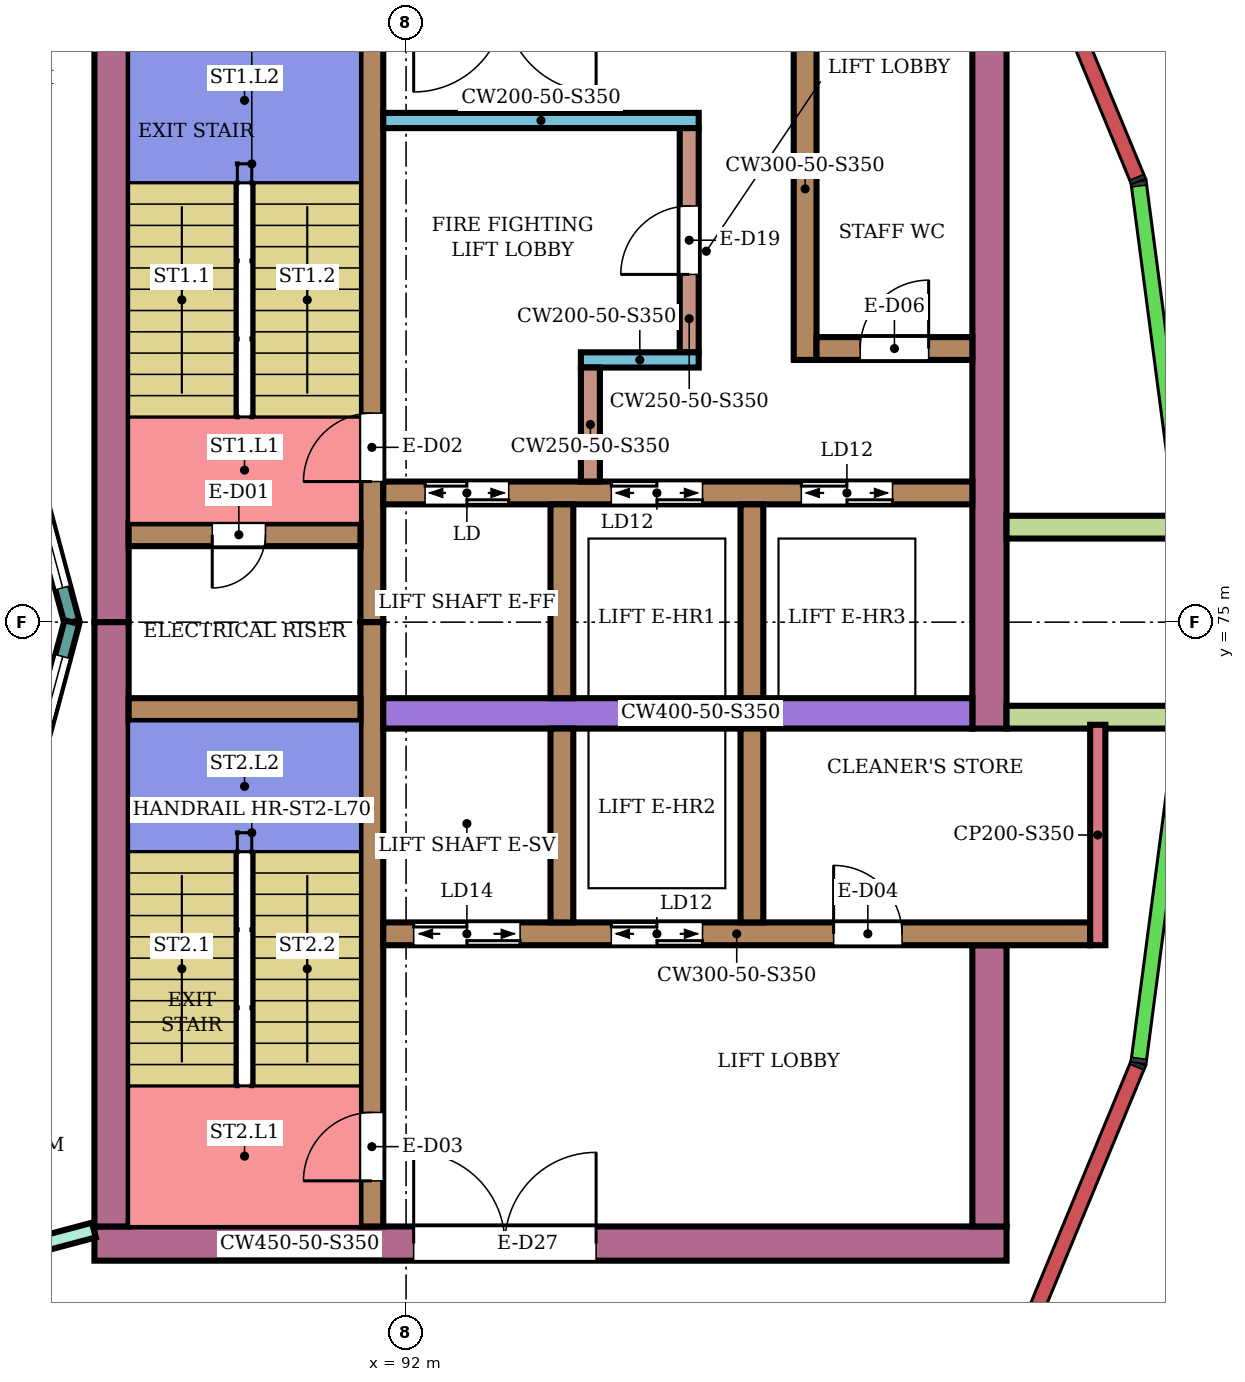
"""IFC4 building model, lengths in metres.
Left out: names, types, materials, properties, quantities, classifications, styles, units other than length and angle.
Written with IfcOpenShell. Run it as: python <this file> out.ifc"""

import sys

from ifc_helpers import new_model, si_unit, direction, frame, frame_2d, origin, place, context, subcontext, project, spatial, rectangle, extrude, element, fill, save


model = new_model("IFC4")
c1 = context("Model", 3, precision=1e-05, world=origin(), true_north=direction((0.0, 1.0)))
c2 = subcontext(c1, "Body", "Model", "MODEL_VIEW")
j1 = project(units=[si_unit("LENGTHUNIT", "METRE"), si_unit("PLANEANGLEUNIT", "RADIAN")], contexts=[c1])
p1 = place(None, origin())
s1 = spatial("IfcSite", under=j1, at=p1, CompositionType="ELEMENT")
p2 = place(p1, origin())
s2 = spatial("IfcBuilding", under=s1, at=p2, CompositionType="ELEMENT")
p3 = place(p2, frame((0.0, 0.0, 305.1)))
s3 = spatial("IfcBuildingStorey", under=s2, at=p3, CompositionType="ELEMENT", Elevation=305.1)
p4 = place(p3, frame((87.9, 66.825, 0.0), z_axis=(0.0, 0.0, 1.0), x_axis=(1.0, 0.0, 0.0)))
e1 = element("IfcWall", 1, at=p4, inside=s3, PredefinedType="SHEAR", context=c2, shape_type="SweptSolid", body=[
    extrude(rectangle(XDim=12.0, YDim=0.45, at=frame_2d((6.0, 0.0))), origin(), (0.0, 0.0, 1.0), 3.85),
])
p5 = place(p4, frame((4.2, 0.0, 0.0)))
e2 = element("IfcOpeningElement", 2, at=p5, cuts=e1, PredefinedType="OPENING", context=c2, shape_type="SweptSolid", body=[
    extrude(rectangle(XDim=2.4, YDim=2.4, at=frame_2d((1.2, 1.2))), frame((0.0, 0.235, 0.0), z_axis=(0.0, -1.0, 0.0), x_axis=(1.0, 0.0, 0.0)), (0.0, 0.0, 1.0), 0.47),
])
for number, where, z_axis, x_axis in (
    (3, (88.125, 75.0, 0.0), (0.0, 0.0, 1.0), (0.0, 1.0, 0.0)),
    (4, (88.125, 67.05, 0.0), (0.0, 0.0, 1.0), (0.0, 1.0, 0.0)),
):
    element("IfcWall", number, at=place(p3, frame(where, z_axis=z_axis, x_axis=x_axis)), inside=s3, PredefinedType="SHEAR", context=c2, shape_type="SweptSolid", body=[
        extrude(rectangle(XDim=7.95, YDim=0.45, at=frame_2d((3.975, 0.0))), origin(), (0.0, 0.0, 1.0), 3.85),
    ])
p6 = place(p3, frame((99.675, 73.6, 0.0), z_axis=(0.0, 0.0, 1.0), x_axis=(0.0, 1.0, 0.0)))
e5 = element("IfcWall", 5, at=p6, inside=s3, PredefinedType="SHEAR", context=c2, shape_type="SweptSolid", body=[
    extrude(rectangle(XDim=9.35, YDim=0.45, at=frame_2d((4.675, 0.0))), origin(), (0.0, 0.0, 1.0), 3.85),
])
p7 = place(p3, frame((99.675, 67.05, 0.0), z_axis=(0.0, 0.0, 1.0), x_axis=(0.0, 1.0, 0.0)))
e6 = element("IfcWall", 6, at=p7, inside=s3, PredefinedType="SHEAR", context=c2, shape_type="SweptSolid", body=[
    extrude(rectangle(XDim=3.7, YDim=0.45, at=frame_2d((1.85, 0.0))), origin(), (0.0, 0.0, 1.0), 3.85),
])
p8 = place(p3, frame((91.55, 75.0, 0.0), z_axis=(0.0, 0.0, 1.0), x_axis=(0.0, 1.0, 0.0)))
e7 = element("IfcWall", 7, at=p8, inside=s3, PredefinedType="SHEAR", context=c2, shape_type="SweptSolid", body=[
    extrude(rectangle(XDim=7.95, YDim=0.3, at=frame_2d((3.975, 0.0))), origin(), (0.0, 0.0, 1.0), 3.85),
])
p9 = place(p8, frame((1.85, 0.0, 0.0)))
e8 = element("IfcOpeningElement", 8, at=p9, cuts=e7, PredefinedType="OPENING", context=c2, shape_type="SweptSolid", body=[
    extrude(rectangle(XDim=0.9, YDim=2.1, at=frame_2d((0.45, 1.05))), frame((0.0, 0.16, 0.0), z_axis=(0.0, -1.0, 0.0), x_axis=(1.0, 0.0, 0.0)), (0.0, 0.0, 1.0), 0.32),
])
p10 = place(p3, frame((91.55, 67.05, 0.0), z_axis=(0.0, 0.0, 1.0), x_axis=(0.0, 1.0, 0.0)))
e9 = element("IfcWall", 9, at=p10, inside=s3, PredefinedType="SHEAR", context=c2, shape_type="SweptSolid", body=[
    extrude(rectangle(XDim=7.95, YDim=0.3, at=frame_2d((3.975, 0.0))), origin(), (0.0, 0.0, 1.0), 3.85),
])
p11 = place(p10, frame((0.6, 0.0, 0.0)))
e10 = element("IfcOpeningElement", 10, at=p11, cuts=e9, PredefinedType="OPENING", context=c2, shape_type="SweptSolid", body=[
    extrude(rectangle(XDim=0.9, YDim=2.1, at=frame_2d((0.45, 1.05))), frame((0.0, 0.16, 0.0), z_axis=(0.0, -1.0, 0.0), x_axis=(1.0, 0.0, 0.0)), (0.0, 0.0, 1.0), 0.32),
])
p12 = place(p3, frame((88.35, 76.15, 0.0), z_axis=(0.0, 0.0, 1.0), x_axis=(1.0, 0.0, 0.0)))
e11 = element("IfcWall", 11, at=p12, inside=s3, PredefinedType="SHEAR", context=c2, shape_type="SweptSolid", body=[
    extrude(rectangle(XDim=3.05, YDim=0.3, at=frame_2d((1.525, 0.0))), origin(), (0.0, 0.0, 1.0), 3.85),
])
p13 = place(p12, frame((1.1, 0.0, 0.0)))
e12 = element("IfcOpeningElement", 12, at=p13, cuts=e11, PredefinedType="OPENING", context=c2, shape_type="SweptSolid", body=[
    extrude(rectangle(XDim=0.7, YDim=2.0, at=frame_2d((0.35, 1.0))), frame((0.0, 0.16, 0.0), z_axis=(0.0, -1.0, 0.0), x_axis=(1.0, 0.0, 0.0)), (0.0, 0.0, 1.0), 0.32),
])
p14 = place(p3, frame((88.35, 73.85, 0.0), z_axis=(0.0, 0.0, 1.0), x_axis=(1.0, 0.0, 0.0)))
e13 = element("IfcWall", 13, at=p14, inside=s3, PredefinedType="SHEAR", context=c2, shape_type="SweptSolid", body=[
    extrude(rectangle(XDim=3.05, YDim=0.3, at=frame_2d((1.525, 0.0))), origin(), (0.0, 0.0, 1.0), 3.85),
])
p15 = place(p3, frame((91.7, 76.7, 0.0), z_axis=(0.0, 0.0, 1.0), x_axis=(1.0, 0.0, 0.0)))
e14 = element("IfcWall", 14, at=p15, inside=s3, PredefinedType="SHEAR", context=c2, shape_type="SweptSolid", body=[
    extrude(rectangle(XDim=7.75, YDim=0.3, at=frame_2d((3.875, 0.0))), origin(), (0.0, 0.0, 1.0), 3.85),
])
p16 = place(p15, frame((0.55, 0.0, 0.0)))
e15 = element("IfcOpeningElement", 15, at=p16, cuts=e14, PredefinedType="OPENING", context=c2, shape_type="SweptSolid", body=[
    extrude(rectangle(XDim=1.1, YDim=2.1, at=frame_2d((0.55, 1.05))), frame((0.0, 0.16, 0.0), z_axis=(0.0, -1.0, 0.0), x_axis=(1.0, 0.0, 0.0)), (0.0, 0.0, 1.0), 0.32),
])
p17 = place(p15, frame((3.0, 0.0, 0.0)))
e16 = element("IfcOpeningElement", 16, at=p17, cuts=e14, PredefinedType="OPENING", context=c2, shape_type="SweptSolid", body=[
    extrude(rectangle(XDim=1.2, YDim=2.1, at=frame_2d((0.6, 1.05))), frame((0.0, 0.16, 0.0), z_axis=(0.0, -1.0, 0.0), x_axis=(1.0, 0.0, 0.0)), (0.0, 0.0, 1.0), 0.32),
])
p18 = place(p15, frame((5.5, 0.0, 0.0)))
e17 = element("IfcOpeningElement", 17, at=p18, cuts=e14, PredefinedType="OPENING", context=c2, shape_type="SweptSolid", body=[
    extrude(rectangle(XDim=1.2, YDim=2.1, at=frame_2d((0.6, 1.05))), frame((0.0, 0.16, 0.0), z_axis=(0.0, -1.0, 0.0), x_axis=(1.0, 0.0, 0.0)), (0.0, 0.0, 1.0), 0.32),
])
p19 = place(p3, frame((91.7, 73.8, 0.0), z_axis=(0.0, 0.0, 1.0), x_axis=(1.0, 0.0, 0.0)))
e18 = element("IfcWall", 18, at=p19, inside=s3, PredefinedType="SHEAR", context=c2, shape_type="SweptSolid", body=[
    extrude(rectangle(XDim=7.75, YDim=0.4, at=frame_2d((3.875, 0.0))), origin(), (0.0, 0.0, 1.0), 3.85),
])
p20 = place(p3, frame((91.7, 70.9, 0.0), z_axis=(0.0, 0.0, 1.0), x_axis=(1.0, 0.0, 0.0)))
e19 = element("IfcWall", 19, at=p20, inside=s3, PredefinedType="SHEAR", context=c2, shape_type="SweptSolid", body=[
    extrude(rectangle(XDim=9.3, YDim=0.3, at=frame_2d((4.65, 0.0))), origin(), (0.0, 0.0, 1.0), 3.85),
])
p21 = place(p20, frame((0.4, 0.0, 0.0)))
e20 = element("IfcOpeningElement", 20, at=p21, cuts=e19, PredefinedType="OPENING", context=c2, shape_type="SweptSolid", body=[
    extrude(rectangle(XDim=1.4, YDim=2.1, at=frame_2d((0.7, 1.05))), frame((0.0, 0.16, 0.0), z_axis=(0.0, -1.0, 0.0), x_axis=(1.0, 0.0, 0.0)), (0.0, 0.0, 1.0), 0.32),
])
p22 = place(p20, frame((3.0, 0.0, 0.0)))
e21 = element("IfcOpeningElement", 21, at=p22, cuts=e19, PredefinedType="OPENING", context=c2, shape_type="SweptSolid", body=[
    extrude(rectangle(XDim=1.2, YDim=2.1, at=frame_2d((0.6, 1.05))), frame((0.0, 0.16, 0.0), z_axis=(0.0, -1.0, 0.0), x_axis=(1.0, 0.0, 0.0)), (0.0, 0.0, 1.0), 0.32),
])
p23 = place(p20, frame((5.925, 0.0, 0.0)))
e22 = element("IfcOpeningElement", 22, at=p23, cuts=e19, PredefinedType="OPENING", context=c2, shape_type="SweptSolid", body=[
    extrude(rectangle(XDim=0.9, YDim=2.1, at=frame_2d((0.45, 1.05))), frame((0.0, 0.16, 0.0), z_axis=(0.0, -1.0, 0.0), x_axis=(1.0, 0.0, 0.0)), (0.0, 0.0, 1.0), 0.32),
])
for number, where, z_axis, x_axis in (
    (23, (94.05, 74.0, 0.0), (0.0, 0.0, 1.0), (0.0, 1.0, 0.0)),
    (24, (96.55, 74.0, 0.0), (0.0, 0.0, 1.0), (0.0, 1.0, 0.0)),
    (25, (94.05, 71.05, 0.0), (0.0, 0.0, 1.0), (0.0, 1.0, 0.0)),
    (26, (96.55, 71.05, 0.0), (0.0, 0.0, 1.0), (0.0, 1.0, 0.0)),
):
    element("IfcWall", number, at=place(p3, frame(where, z_axis=z_axis, x_axis=x_axis)), inside=s3, PredefinedType="SHEAR", context=c2, shape_type="SweptSolid", body=[
        extrude(rectangle(XDim=2.55, YDim=0.3, at=frame_2d((1.275, 0.0))), origin(), (0.0, 0.0, 1.0), 3.85),
    ])
p24 = place(p3, frame((91.7, 81.6, 0.0), z_axis=(0.0, 0.0, 1.0), x_axis=(1.0, 0.0, 0.0)))
e27 = element("IfcWall", 27, at=p24, inside=s3, PredefinedType="SHEAR", context=c2, shape_type="SweptSolid", body=[
    extrude(rectangle(XDim=4.15, YDim=0.2, at=frame_2d((2.075, 0.0))), origin(), (0.0, 0.0, 1.0), 3.85),
])
p25 = place(p3, frame((95.725, 78.55, 0.0), z_axis=(0.0, 0.0, 1.0), x_axis=(0.0, 1.0, 0.0)))
e28 = element("IfcWall", 28, at=p25, inside=s3, PredefinedType="SHEAR", context=c2, shape_type="SweptSolid", body=[
    extrude(rectangle(XDim=2.95, YDim=0.25, at=frame_2d((1.475, 0.0))), origin(), (0.0, 0.0, 1.0), 3.85),
])
p26 = place(p25, frame((1.025, 0.0, 0.0)))
e29 = element("IfcOpeningElement", 29, at=p26, cuts=e28, PredefinedType="OPENING", context=c2, shape_type="SweptSolid", body=[
    extrude(rectangle(XDim=0.9, YDim=2.1, at=frame_2d((0.45, 1.05))), frame((0.0, 0.135, 0.0), z_axis=(0.0, -1.0, 0.0), x_axis=(1.0, 0.0, 0.0)), (0.0, 0.0, 1.0), 0.27),
])
p27 = place(p3, frame((94.3, 78.45, 0.0), z_axis=(0.0, 0.0, 1.0), x_axis=(1.0, 0.0, 0.0)))
e30 = element("IfcWall", 30, at=p27, inside=s3, PredefinedType="SHEAR", context=c2, shape_type="SweptSolid", body=[
    extrude(rectangle(XDim=1.55, YDim=0.2, at=frame_2d((0.775, 0.0))), origin(), (0.0, 0.0, 1.0), 3.85),
])
p28 = place(p3, frame((94.425, 76.85, 0.0), z_axis=(0.0, 0.0, 1.0), x_axis=(0.0, 1.0, 0.0)))
e31 = element("IfcWall", 31, at=p28, inside=s3, PredefinedType="SHEAR", context=c2, shape_type="SweptSolid", body=[
    extrude(rectangle(XDim=1.5, YDim=0.25, at=frame_2d((0.75, 0.0))), origin(), (0.0, 0.0, 1.0), 3.85),
])
p29 = place(p3, frame((97.25, 78.45, 0.0), z_axis=(0.0, 0.0, 1.0), x_axis=(0.0, 1.0, 0.0)))
e32 = element("IfcWall", 32, at=p29, inside=s3, PredefinedType="SHEAR", context=c2, shape_type="SweptSolid", body=[
    extrude(rectangle(XDim=4.5, YDim=0.3, at=frame_2d((2.25, 0.0))), origin(), (0.0, 0.0, 1.0), 3.85),
])
p30 = place(p3, frame((97.4, 78.6, 0.0), z_axis=(0.0, 0.0, 1.0), x_axis=(1.0, 0.0, 0.0)))
e33 = element("IfcWall", 33, at=p30, inside=s3, PredefinedType="SHEAR", context=c2, shape_type="SweptSolid", body=[
    extrude(rectangle(XDim=2.05, YDim=0.3, at=frame_2d((1.025, 0.0))), origin(), (0.0, 0.0, 1.0), 3.85),
])
p31 = place(p30, frame((0.575, 0.0, 0.0)))
e34 = element("IfcOpeningElement", 34, at=p31, cuts=e33, PredefinedType="OPENING", context=c2, shape_type="SweptSolid", body=[
    extrude(rectangle(XDim=0.9, YDim=2.1, at=frame_2d((0.45, 1.05))), frame((0.0, 0.16, 0.0), z_axis=(0.0, -1.0, 0.0), x_axis=(1.0, 0.0, 0.0)), (0.0, 0.0, 1.0), 0.32),
])
for number, where, z_axis, x_axis in (
    (35, (99.9, 73.75, 0.0), (0.0, 0.0, 1.0), (1.0, 0.0, 0.0)),
    (36, (99.9, 76.25, 0.0), (0.0, 0.0, 1.0), (1.0, 0.0, 0.0)),
):
    element("IfcWall", number, at=place(p3, frame(where, z_axis=z_axis, x_axis=x_axis)), inside=s3, PredefinedType="NOTDEFINED", context=c2, shape_type="SweptSolid", body=[
        extrude(rectangle(XDim=2.416, YDim=0.3, at=frame_2d((1.208, 0.0))), origin(), (0.0, 0.0, 1.0), 4.2),
    ])
p32 = place(p3, frame((87.604, 75.0, 0.0), z_axis=(0.0, 0.0, 1.0), x_axis=(-0.258789828301, 0.965933654434, 0.0)))
e37 = element("IfcWall", 37, at=p32, inside=s3, PredefinedType="NOTDEFINED", context=c2, shape_type="SweptSolid", body=[
    extrude(rectangle(XDim=3.936, YDim=0.2, at=frame_2d((1.968, 0.0))), origin(), (0.0, 0.0, 1.0), 4.2),
])
p33 = place(p32, frame((0.468, 0.0, 0.9)))
e38 = element("IfcOpeningElement", 38, at=p33, cuts=e37, PredefinedType="OPENING", context=c2, shape_type="SweptSolid", body=[
    extrude(rectangle(XDim=3.0, YDim=2.3, at=frame_2d((1.5, 1.15))), frame((0.0, 0.11, 0.0), z_axis=(0.0, -1.0, 0.0), x_axis=(1.0, 0.0, 0.0)), (0.0, 0.0, 1.0), 0.22),
])
p34 = place(p3, frame((86.585, 71.198, 0.0), z_axis=(0.0, 0.0, 1.0), x_axis=(0.258789828301, 0.965933654434, 0.0)))
e39 = element("IfcWall", 39, at=p34, inside=s3, PredefinedType="NOTDEFINED", context=c2, shape_type="SweptSolid", body=[
    extrude(rectangle(XDim=3.936, YDim=0.2, at=frame_2d((1.968, 0.0))), origin(), (0.0, 0.0, 1.0), 4.2),
])
p35 = place(p34, frame((0.468, 0.0, 0.9)))
e40 = element("IfcOpeningElement", 40, at=p35, cuts=e39, PredefinedType="OPENING", context=c2, shape_type="SweptSolid", body=[
    extrude(rectangle(XDim=3.0, YDim=2.3, at=frame_2d((1.5, 1.15))), frame((0.0, 0.11, 0.0), z_axis=(0.0, -1.0, 0.0), x_axis=(1.0, 0.0, 0.0)), (0.0, 0.0, 1.0), 0.22),
])
p36 = place(p3, frame((80.125, 64.932, 0.0), z_axis=(0.0, 0.0, 1.0), x_axis=(0.966236955806, 0.257655089674, 0.0)))
e41 = element("IfcWall", 41, at=p36, inside=s3, PredefinedType="PARTITIONING", context=c2, shape_type="SweptSolid", body=[
    extrude(rectangle(XDim=8.039, YDim=0.2, at=frame_2d((4.02, 0.0))), origin(), (0.0, 0.0, 1.0), 3.75),
])
p37 = place(p36, frame((6.298, 0.0, 0.0)))
e42 = element("IfcOpeningElement", 42, at=p37, cuts=e41, PredefinedType="OPENING", context=c2, shape_type="SweptSolid", body=[
    extrude(rectangle(XDim=0.9, YDim=2.1, at=frame_2d((0.45, 1.05))), frame((0.0, 0.11, 0.0), z_axis=(0.0, -1.0, 0.0), x_axis=(1.0, 0.0, 0.0)), (0.0, 0.0, 1.0), 0.22),
])
p38 = place(p36, frame((2.045, 0.0, 0.0)))
e43 = element("IfcOpeningElement", 43, at=p38, cuts=e41, PredefinedType="OPENING", context=c2, shape_type="SweptSolid", body=[
    extrude(rectangle(XDim=0.9, YDim=2.1, at=frame_2d((0.45, 1.05))), frame((0.0, 0.11, 0.0), z_axis=(0.0, -1.0, 0.0), x_axis=(1.0, 0.0, 0.0)), (0.0, 0.0, 1.0), 0.22),
])
p39 = place(p3, frame((101.1, 70.75, 0.0), z_axis=(0.0, 0.0, 1.0), x_axis=(0.0, 1.0, 0.0)))
e44 = element("IfcWall", 44, at=p39, inside=s3, PredefinedType="PARTITIONING", context=c2, shape_type="SweptSolid", body=[
    extrude(rectangle(XDim=2.9, YDim=0.2, at=frame_2d((1.45, 0.0))), origin(), (0.0, 0.0, 1.0), 3.85),
])
p40 = place(p33, origin())
e45 = element("IfcWindow", 45, at=p40, inside=s3, PartitioningType="SINGLE_PANEL", PredefinedType="WINDOW", context=c2, shape_type="SweptSolid", body=[
    extrude(rectangle(XDim=3.0, YDim=2.3, at=frame_2d((1.5, 1.15))), frame((0.0, 0.03, 0.0), z_axis=(0.0, -1.0, 0.0), x_axis=(1.0, 0.0, 0.0)), (0.0, 0.0, 1.0), 0.06),
])
fill(e38, e45)
p41 = place(p35, origin())
e46 = element("IfcWindow", 46, at=p41, inside=s3, PartitioningType="SINGLE_PANEL", PredefinedType="WINDOW", context=c2, shape_type="SweptSolid", body=[
    extrude(rectangle(XDim=3.0, YDim=2.3, at=frame_2d((1.5, 1.15))), frame((0.0, 0.03, 0.0), z_axis=(0.0, -1.0, 0.0), x_axis=(1.0, 0.0, 0.0)), (0.0, 0.0, 1.0), 0.06),
])
fill(e40, e46)
p42 = place(p13, frame((0.7, 0.0, 0.0), z_axis=(0.0, 0.0, 1.0), x_axis=(-1.0, 0.0, 0.0)))
e47 = element("IfcDoor", 47, at=p42, inside=s3, OperationType="SINGLE_SWING_RIGHT", PredefinedType="DOOR", context=c2, shape_type="SweptSolid", body=[
    extrude(rectangle(XDim=0.7, YDim=2.0, at=frame_2d((0.35, 1.0))), frame((0.0, 0.025, 0.0), z_axis=(0.0, -1.0, 0.0), x_axis=(1.0, 0.0, 0.0)), (0.0, 0.0, 1.0), 0.05),
])
fill(e12, e47)
p43 = place(p9, origin())
e48 = element("IfcDoor", 48, at=p43, inside=s3, OperationType="SINGLE_SWING_LEFT", PredefinedType="DOOR", context=c2, shape_type="SweptSolid", body=[
    extrude(rectangle(XDim=0.9, YDim=2.1, at=frame_2d((0.45, 1.05))), frame((0.0, 0.025, 0.0), z_axis=(0.0, -1.0, 0.0), x_axis=(1.0, 0.0, 0.0)), (0.0, 0.0, 1.0), 0.05),
])
fill(e8, e48)
p44 = place(p11, origin())
e49 = element("IfcDoor", 49, at=p44, inside=s3, OperationType="SINGLE_SWING_LEFT", PredefinedType="DOOR", context=c2, shape_type="SweptSolid", body=[
    extrude(rectangle(XDim=0.9, YDim=2.1, at=frame_2d((0.45, 1.05))), frame((0.0, 0.025, 0.0), z_axis=(0.0, -1.0, 0.0), x_axis=(1.0, 0.0, 0.0)), (0.0, 0.0, 1.0), 0.05),
])
fill(e10, e49)
p45 = place(p16, origin())
e50 = element("IfcDoor", 50, at=p45, inside=s3, OperationType="DOUBLE_DOOR_SLIDING", PredefinedType="DOOR", context=c2, shape_type="SweptSolid", body=[
    extrude(rectangle(XDim=1.1, YDim=2.1, at=frame_2d((0.55, 1.05))), frame((0.0, 0.025, 0.0), z_axis=(0.0, -1.0, 0.0), x_axis=(1.0, 0.0, 0.0)), (0.0, 0.0, 1.0), 0.05),
])
fill(e15, e50)
p46 = place(p17, origin())
e51 = element("IfcDoor", 51, at=p46, inside=s3, OperationType="DOUBLE_DOOR_SLIDING", PredefinedType="DOOR", context=c2, shape_type="SweptSolid", body=[
    extrude(rectangle(XDim=1.2, YDim=2.1, at=frame_2d((0.6, 1.05))), frame((0.0, 0.025, 0.0), z_axis=(0.0, -1.0, 0.0), x_axis=(1.0, 0.0, 0.0)), (0.0, 0.0, 1.0), 0.05),
])
fill(e16, e51)
p47 = place(p18, origin())
e52 = element("IfcDoor", 52, at=p47, inside=s3, OperationType="DOUBLE_DOOR_SLIDING", PredefinedType="DOOR", context=c2, shape_type="SweptSolid", body=[
    extrude(rectangle(XDim=1.2, YDim=2.1, at=frame_2d((0.6, 1.05))), frame((0.0, 0.025, 0.0), z_axis=(0.0, -1.0, 0.0), x_axis=(1.0, 0.0, 0.0)), (0.0, 0.0, 1.0), 0.05),
])
fill(e17, e52)
p48 = place(p21, origin())
e53 = element("IfcDoor", 53, at=p48, inside=s3, OperationType="DOUBLE_DOOR_SLIDING", PredefinedType="DOOR", context=c2, shape_type="SweptSolid", body=[
    extrude(rectangle(XDim=1.4, YDim=2.1, at=frame_2d((0.7, 1.05))), frame((0.0, 0.025, 0.0), z_axis=(0.0, -1.0, 0.0), x_axis=(1.0, 0.0, 0.0)), (0.0, 0.0, 1.0), 0.05),
])
fill(e20, e53)
p49 = place(p22, origin())
e54 = element("IfcDoor", 54, at=p49, inside=s3, OperationType="DOUBLE_DOOR_SLIDING", PredefinedType="DOOR", context=c2, shape_type="SweptSolid", body=[
    extrude(rectangle(XDim=1.2, YDim=2.1, at=frame_2d((0.6, 1.05))), frame((0.0, 0.025, 0.0), z_axis=(0.0, -1.0, 0.0), x_axis=(1.0, 0.0, 0.0)), (0.0, 0.0, 1.0), 0.05),
])
fill(e21, e54)
p50 = place(p23, origin())
e55 = element("IfcDoor", 55, at=p50, inside=s3, OperationType="SINGLE_SWING_LEFT", PredefinedType="DOOR", context=c2, shape_type="SweptSolid", body=[
    extrude(rectangle(XDim=0.9, YDim=2.1, at=frame_2d((0.45, 1.05))), frame((0.0, 0.025, 0.0), z_axis=(0.0, -1.0, 0.0), x_axis=(1.0, 0.0, 0.0)), (0.0, 0.0, 1.0), 0.05),
])
fill(e22, e55)
p51 = place(p26, origin())
e56 = element("IfcDoor", 56, at=p51, inside=s3, OperationType="SINGLE_SWING_LEFT", PredefinedType="DOOR", context=c2, shape_type="SweptSolid", body=[
    extrude(rectangle(XDim=0.9, YDim=2.1, at=frame_2d((0.45, 1.05))), frame((0.0, 0.025, 0.0), z_axis=(0.0, -1.0, 0.0), x_axis=(1.0, 0.0, 0.0)), (0.0, 0.0, 1.0), 0.05),
])
fill(e29, e56)
p52 = place(p31, origin())
e57 = element("IfcDoor", 57, at=p52, inside=s3, OperationType="SINGLE_SWING_RIGHT", PredefinedType="DOOR", context=c2, shape_type="SweptSolid", body=[
    extrude(rectangle(XDim=0.9, YDim=2.1, at=frame_2d((0.45, 1.05))), frame((0.0, 0.025, 0.0), z_axis=(0.0, -1.0, 0.0), x_axis=(1.0, 0.0, 0.0)), (0.0, 0.0, 1.0), 0.05),
])
fill(e34, e57)
p53 = place(p5, origin())
e58 = element("IfcDoor", 58, at=p53, inside=s3, OperationType="DOUBLE_DOOR_SINGLE_SWING", PredefinedType="DOOR", context=c2, shape_type="SweptSolid", body=[
    extrude(rectangle(XDim=2.4, YDim=2.4, at=frame_2d((1.2, 1.2))), frame((0.0, 0.025, 0.0), z_axis=(0.0, -1.0, 0.0), x_axis=(1.0, 0.0, 0.0)), (0.0, 0.0, 1.0), 0.05),
])
fill(e2, e58)
save(model, sys.argv[1])
